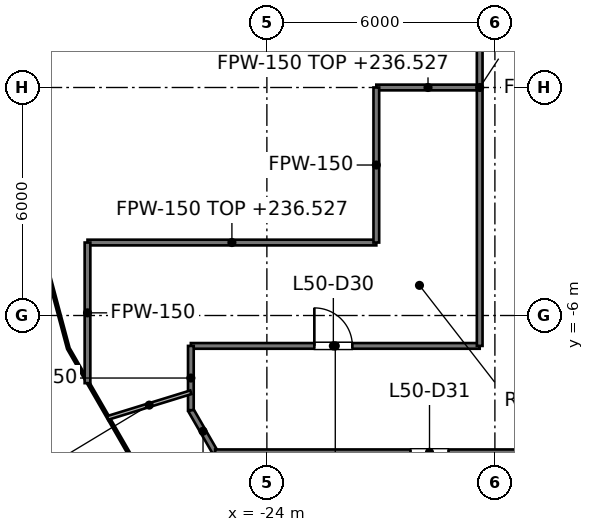
"""IFC4 building model, lengths in metres.
Left out: names, types, materials, properties, quantities, classifications, styles, units other than length and angle.
Written with IfcOpenShell. Run it as: python <this file> out.ifc"""

import sys

from ifc_helpers import new_model, si_unit, direction, frame, frame_2d, origin, place, context, subcontext, project, spatial, rectangle, extrude, element, fill, save


model = new_model("IFC4")
c1 = context("Model", 3, precision=1e-05, world=origin(), true_north=direction((0.0, 1.0)))
c2 = subcontext(c1, "Body", "Model", "MODEL_VIEW")
j1 = project(units=[si_unit("LENGTHUNIT", "METRE"), si_unit("PLANEANGLEUNIT", "RADIAN")], contexts=[c1])
p1 = place(None, origin())
s1 = spatial("IfcSite", under=j1, at=p1, CompositionType="ELEMENT")
p2 = place(p1, origin())
s2 = spatial("IfcBuilding", under=s1, at=p2, CompositionType="ELEMENT")
p3 = place(p2, frame((0.0, 0.0, 233.6)))
s3 = spatial("IfcBuildingStorey", under=s2, at=p3, CompositionType="ELEMENT", Elevation=233.6)
p4 = place(p3, frame((-26.0, -8.491, 0.0), z_axis=(0.0, 0.0, 1.0), x_axis=(0.499870984138, -0.866099878315, 0.0)))
e1 = element("IfcWall", 1, at=p4, inside=s3, PredefinedType="PARTITIONING", context=c2, shape_type="SweptSolid", body=[
    extrude(rectangle(XDim=1.281, YDim=0.15, at=frame_2d((0.64, 0.0))), origin(), (0.0, 0.0, 1.0), 2.995),
])
p5 = place(p3, frame((-25.36, -9.6, 0.0), z_axis=(0.0, 0.0, 1.0), x_axis=(1.0, 0.0, 0.0)))
e2 = element("IfcWall", 2, at=p5, inside=s3, PredefinedType="PARTITIONING", context=c2, shape_type="SweptSolid", body=[
    extrude(rectangle(XDim=50.721, YDim=0.15, at=frame_2d((25.361, 0.0))), origin(), (0.0, 0.0, 1.0), 2.927),
])
p6 = place(p5, frame((20.826, 0.0, 0.0)))
e3 = element("IfcOpeningElement", 3, at=p6, cuts=e2, PredefinedType="OPENING", context=c2, shape_type="SweptSolid", body=[
    extrude(rectangle(XDim=1.0, YDim=2.1, at=frame_2d((0.5, 1.05))), frame((0.0, 0.075, 0.0), z_axis=(0.0, -1.0, 0.0), x_axis=(1.0, 0.0, 0.0)), (0.0, 0.0, 1.0), 0.15),
])
p7 = place(p5, frame((25.959, 0.0, 0.0)))
e4 = element("IfcOpeningElement", 4, at=p7, cuts=e2, PredefinedType="OPENING", context=c2, shape_type="SweptSolid", body=[
    extrude(rectangle(XDim=1.0, YDim=2.1, at=frame_2d((0.5, 1.05))), frame((0.0, 0.075, 0.0), z_axis=(0.0, -1.0, 0.0), x_axis=(1.0, 0.0, 0.0)), (0.0, 0.0, 1.0), 0.15),
])
p8 = place(p5, frame((32.021, 0.0, 0.0)))
e5 = element("IfcOpeningElement", 5, at=p8, cuts=e2, PredefinedType="OPENING", context=c2, shape_type="SweptSolid", body=[
    extrude(rectangle(XDim=1.0, YDim=2.1, at=frame_2d((0.5, 1.05))), frame((0.0, 0.075, 0.0), z_axis=(0.0, -1.0, 0.0), x_axis=(1.0, 0.0, 0.0)), (0.0, 0.0, 1.0), 0.15),
])
p9 = place(p5, frame((42.291, 0.0, 0.0)))
e6 = element("IfcOpeningElement", 6, at=p9, cuts=e2, PredefinedType="OPENING", context=c2, shape_type="SweptSolid", body=[
    extrude(rectangle(XDim=1.2, YDim=2.1, at=frame_2d((0.6, 1.05))), frame((0.0, 0.075, 0.0), z_axis=(0.0, -1.0, 0.0), x_axis=(1.0, 0.0, 0.0)), (0.0, 0.0, 1.0), 0.15),
])
p10 = place(p5, frame((5.139, 0.0, 0.0)))
e7 = element("IfcOpeningElement", 7, at=p10, cuts=e2, PredefinedType="OPENING", context=c2, shape_type="SweptSolid", body=[
    extrude(rectangle(XDim=1.0, YDim=2.1, at=frame_2d((0.5, 1.05))), frame((0.0, 0.075, 0.0), z_axis=(0.0, -1.0, 0.0), x_axis=(1.0, 0.0, 0.0)), (0.0, 0.0, 1.0), 0.15),
])
p11 = place(p5, frame((14.998, 0.0, 0.0)))
e8 = element("IfcOpeningElement", 8, at=p11, cuts=e2, PredefinedType="OPENING", context=c2, shape_type="SweptSolid", body=[
    extrude(rectangle(XDim=1.0, YDim=2.1, at=frame_2d((0.5, 1.05))), frame((0.0, 0.075, 0.0), z_axis=(0.0, -1.0, 0.0), x_axis=(1.0, 0.0, 0.0)), (0.0, 0.0, 1.0), 0.15),
])
p12 = place(p3, frame((-26.0, -6.8, 0.0), z_axis=(0.0, 0.0, 1.0), x_axis=(1.0, 0.0, 0.0)))
e9 = element("IfcWall", 9, at=p12, inside=s3, PredefinedType="PARTITIONING", context=c2, shape_type="SweptSolid", body=[
    extrude(rectangle(XDim=7.6, YDim=0.15, at=frame_2d((3.8, 0.0))), origin(), (0.0, 0.0, 1.0), 2.995),
])
p13 = place(p12, frame((3.249, 0.0, 0.0)))
e10 = element("IfcOpeningElement", 10, at=p13, cuts=e9, PredefinedType="OPENING", context=c2, shape_type="SweptSolid", body=[
    extrude(rectangle(XDim=1.0, YDim=2.1, at=frame_2d((0.5, 1.05))), frame((0.0, 0.075, 0.0), z_axis=(0.0, -1.0, 0.0), x_axis=(1.0, 0.0, 0.0)), (0.0, 0.0, 1.0), 0.15),
])
p14 = place(p3, frame((-28.72, -4.08, 0.0), z_axis=(0.0, 0.0, 1.0), x_axis=(1.0, 0.0, 0.0)))
e11 = element("IfcWall", 11, at=p14, inside=s3, PredefinedType="PARTITIONING", context=c2, shape_type="SweptSolid", body=[
    extrude(rectangle(XDim=7.6, YDim=0.15, at=frame_2d((3.8, 0.0))), origin(), (0.0, 0.0, 1.0), 2.927),
])
p15 = place(p3, frame((-21.12, 0.0, 0.0), z_axis=(0.0, 0.0, 1.0), x_axis=(1.0, 0.0, 0.0)))
e12 = element("IfcWall", 12, at=p15, inside=s3, PredefinedType="PARTITIONING", context=c2, shape_type="SweptSolid", body=[
    extrude(rectangle(XDim=2.72, YDim=0.15, at=frame_2d((1.36, 0.0))), origin(), (0.0, 0.0, 1.0), 2.927),
])
p16 = place(p3, frame((-18.4, -6.8, 0.0), z_axis=(0.0, 0.0, 1.0), x_axis=(0.0, 1.0, 0.0)))
e13 = element("IfcWall", 13, at=p16, inside=s3, PredefinedType="PARTITIONING", context=c2, shape_type="SweptSolid", body=[
    extrude(rectangle(XDim=13.6, YDim=0.15, at=frame_2d((6.8, 0.0))), origin(), (0.0, 0.0, 1.0), 2.918),
])
p17 = place(p3, frame((-21.12, -4.08, 0.0), z_axis=(0.0, 0.0, 1.0), x_axis=(0.0, 1.0, 0.0)))
e14 = element("IfcWall", 14, at=p17, inside=s3, PredefinedType="PARTITIONING", context=c2, shape_type="SweptSolid", body=[
    extrude(rectangle(XDim=4.08, YDim=0.15, at=frame_2d((2.04, 0.0))), origin(), (0.0, 0.0, 1.0), 2.918),
])
p18 = place(p3, frame((-26.0, -8.491, 0.0), z_axis=(0.0, 0.0, 1.0), x_axis=(0.0, 1.0, 0.0)))
e15 = element("IfcWall", 15, at=p18, inside=s3, PredefinedType="PARTITIONING", context=c2, shape_type="SweptSolid", body=[
    extrude(rectangle(XDim=1.691, YDim=0.15, at=frame_2d((0.845, 0.0))), origin(), (0.0, 0.0, 1.0), 3.85),
])
p19 = place(p3, frame((-28.72, -7.78, 0.0), z_axis=(0.0, 0.0, 1.0), x_axis=(0.0, 1.0, 0.0)))
e16 = element("IfcWall", 16, at=p19, inside=s3, PredefinedType="PARTITIONING", context=c2, shape_type="SweptSolid", body=[
    extrude(rectangle(XDim=3.7, YDim=0.15, at=frame_2d((1.85, 0.0))), origin(), (0.0, 0.0, 1.0), 2.918),
])
p20 = place(p3, frame((-28.191, -8.696, 0.0), z_axis=(0.0, 0.0, 1.0), x_axis=(0.955546181959, 0.294841472904, 0.0)))
e17 = element("IfcWall", 17, at=p20, inside=s3, PredefinedType="PARTITIONING", context=c2, shape_type="SweptSolid", body=[
    extrude(rectangle(XDim=2.293, YDim=0.1, at=frame_2d((1.146, 0.0))), origin(), (0.0, 0.0, 1.0), 3.527),
])
p21 = place(p3, frame((-18.07, -12.32, 0.0), z_axis=(0.0, 0.0, 1.0), x_axis=(0.826209155485, 0.563363498455, 0.0)))
e18 = element("IfcWall", 18, at=p21, inside=s3, PredefinedType="PARTITIONING", context=c2, shape_type="SweptSolid", body=[
    extrude(rectangle(XDim=4.828, YDim=0.1, at=frame_2d((2.414, 0.0))), origin(), (0.0, 0.0, 1.0), 3.85),
])
p22 = place(p13, origin())
e19 = element("IfcDoor", 19, at=p22, inside=s3, OperationType="SINGLE_SWING_LEFT", PredefinedType="DOOR", context=c2, shape_type="SweptSolid", body=[
    extrude(rectangle(XDim=1.0, YDim=2.1, at=frame_2d((0.5, 1.05))), frame((0.0, 0.025, 0.0), z_axis=(0.0, -1.0, 0.0), x_axis=(1.0, 0.0, 0.0)), (0.0, 0.0, 1.0), 0.05),
])
fill(e10, e19)
p23 = place(p10, origin())
e20 = element("IfcDoor", 20, at=p23, inside=s3, OperationType="SINGLE_SWING_RIGHT", PredefinedType="DOOR", context=c2, shape_type="SweptSolid", body=[
    extrude(rectangle(XDim=1.0, YDim=2.1, at=frame_2d((0.5, 1.05))), frame((0.0, 0.025, 0.0), z_axis=(0.0, -1.0, 0.0), x_axis=(1.0, 0.0, 0.0)), (0.0, 0.0, 1.0), 0.05),
])
fill(e7, e20)
save(model, sys.argv[1])
